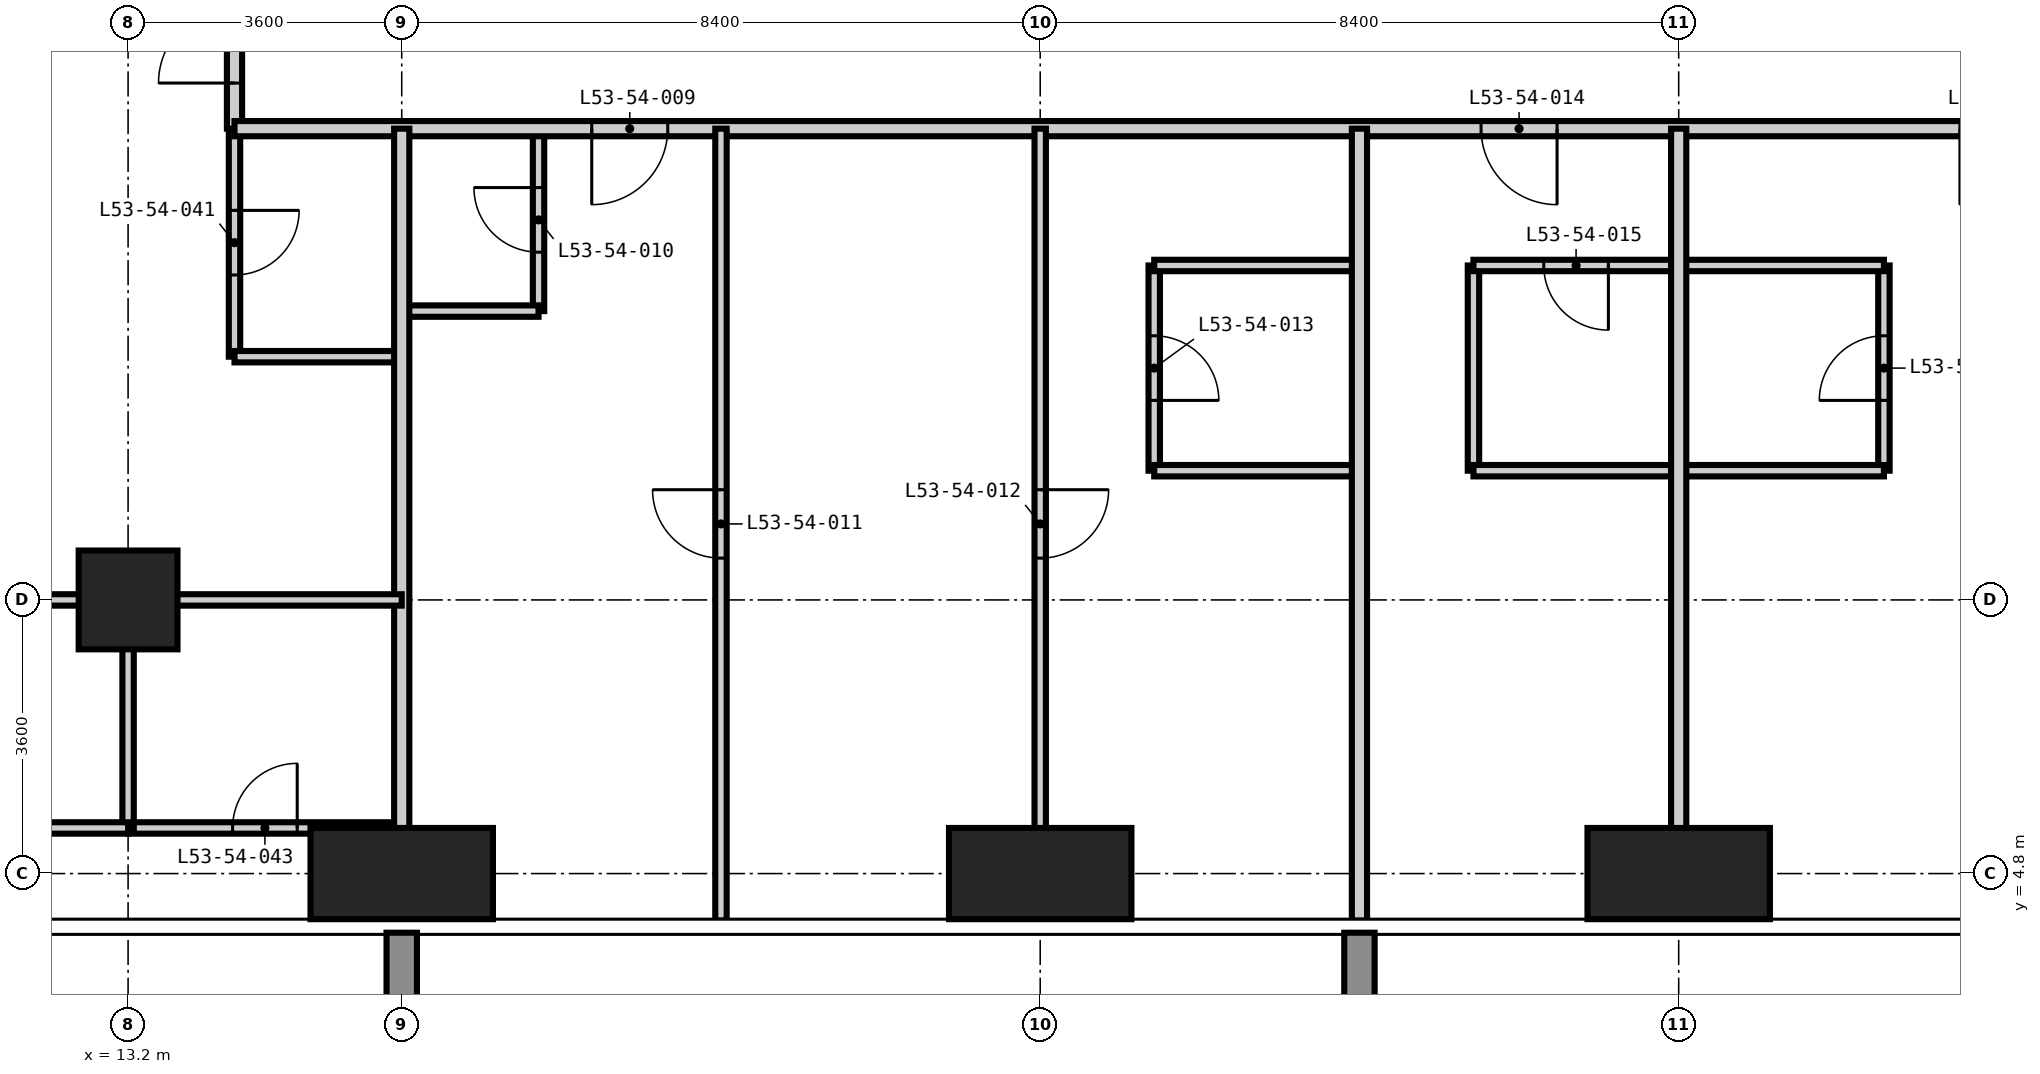
"""IFC4 building model, lengths in metres.
Left out: names, types, materials, properties, quantities, classifications, styles, units other than length and angle.
Written with IfcOpenShell. Run it as: python <this file> out.ifc"""

import sys

from ifc_helpers import new_model, si_unit, direction, frame, frame_2d, origin, origin_2d, place, context, subcontext, project, spatial, rectangle, extrude, element, fill, save


model = new_model("IFC4")
c1 = context("Model", 3, precision=1e-05, world=origin(), true_north=direction((0.0, 1.0)))
c2 = subcontext(c1, "Body", "Model", "MODEL_VIEW")
j1 = project(units=[si_unit("LENGTHUNIT", "METRE"), si_unit("PLANEANGLEUNIT", "RADIAN")], contexts=[c1])
p1 = place(None, origin())
s1 = spatial("IfcSite", under=j1, at=p1, CompositionType="ELEMENT")
p2 = place(p1, origin())
s2 = spatial("IfcBuilding", under=s1, at=p2, CompositionType="ELEMENT")
p3 = place(p2, frame((0.0, 0.0, 205.8)))
s3 = spatial("IfcBuildingStorey", under=s2, at=p3, CompositionType="ELEMENT", Elevation=205.8)
p4 = place(p3, frame((13.2, 8.4, -0.35), z_axis=(0.0, 0.0, 1.0), x_axis=(1.0, 0.0, 0.0)))
e1 = element("IfcColumn", 1, at=p4, inside=s3, PredefinedType="COLUMN", context=c2, shape_type="SweptSolid", body=[
    extrude(rectangle(XDim=1.3, YDim=1.3, at=origin_2d()), origin(), (0.0, 0.0, 1.0), 3.6),
])
for number, where, z_axis, x_axis in (
    (2, (16.8, 4.8, -0.35), (0.0, 0.0, 1.0), (1.0, 0.0, 0.0)),
    (3, (25.2, 4.8, -0.35), (0.0, 0.0, 1.0), (1.0, 0.0, 0.0)),
    (4, (33.6, 4.8, -0.35), (0.0, 0.0, 1.0), (1.0, 0.0, 0.0)),
):
    element("IfcColumn", number, at=place(p3, frame(where, z_axis=z_axis, x_axis=x_axis)), inside=s3, PredefinedType="COLUMN", context=c2, shape_type="SweptSolid", body=[
        extrude(rectangle(XDim=2.4, YDim=1.2, at=origin_2d()), origin(), (0.0, 0.0, 1.0), 3.6),
    ])
p5 = place(p3, frame((14.6, 11.6, 0.0), z_axis=(0.0, 0.0, 1.0), x_axis=(0.0, 1.0, 0.0)))
e5 = element("IfcWall", 5, at=p5, inside=s3, PredefinedType="PARTITIONING", context=c2, shape_type="SweptSolid", body=[
    extrude(rectangle(XDim=3.0, YDim=0.15, at=frame_2d((1.5, 0.0))), origin(), (0.0, 0.0, 1.0), 3.25),
])
p6 = place(p5, frame((1.075, 0.0, 0.0)))
e6 = element("IfcOpeningElement", 6, at=p6, cuts=e5, PredefinedType="OPENING", context=c2, shape_type="SweptSolid", body=[
    extrude(rectangle(XDim=0.85, YDim=2.1, at=frame_2d((0.425, 1.05))), frame((0.0, 0.085, 0.0), z_axis=(0.0, -1.0, 0.0), x_axis=(1.0, 0.0, 0.0)), (0.0, 0.0, 1.0), 0.17),
])
p7 = place(p3, frame((18.6, 12.2, 0.0), z_axis=(0.0, 0.0, 1.0), x_axis=(0.0, 1.0, 0.0)))
e7 = element("IfcWall", 7, at=p7, inside=s3, PredefinedType="PARTITIONING", context=c2, shape_type="SweptSolid", body=[
    extrude(rectangle(XDim=2.4, YDim=0.15, at=frame_2d((1.2, 0.0))), origin(), (0.0, 0.0, 1.0), 3.25),
])
p8 = place(p7, frame((0.775, 0.0, 0.0)))
e8 = element("IfcOpeningElement", 8, at=p8, cuts=e7, PredefinedType="OPENING", context=c2, shape_type="SweptSolid", body=[
    extrude(rectangle(XDim=0.85, YDim=2.1, at=frame_2d((0.425, 1.05))), frame((0.0, 0.085, 0.0), z_axis=(0.0, -1.0, 0.0), x_axis=(1.0, 0.0, 0.0)), (0.0, 0.0, 1.0), 0.17),
])
p9 = place(p3, frame((26.7, 10.1, 0.0), z_axis=(0.0, 0.0, 1.0), x_axis=(0.0, 1.0, 0.0)))
e9 = element("IfcWall", 9, at=p9, inside=s3, PredefinedType="PARTITIONING", context=c2, shape_type="SweptSolid", body=[
    extrude(rectangle(XDim=2.7, YDim=0.15, at=frame_2d((1.35, 0.0))), origin(), (0.0, 0.0, 1.0), 3.25),
])
p10 = place(p9, frame((0.925, 0.0, 0.0)))
e10 = element("IfcOpeningElement", 10, at=p10, cuts=e9, PredefinedType="OPENING", context=c2, shape_type="SweptSolid", body=[
    extrude(rectangle(XDim=0.85, YDim=2.1, at=frame_2d((0.425, 1.05))), frame((0.0, 0.085, 0.0), z_axis=(0.0, -1.0, 0.0), x_axis=(1.0, 0.0, 0.0)), (0.0, 0.0, 1.0), 0.17),
])
p11 = place(p3, frame((30.9, 10.1, 0.0), z_axis=(0.0, 0.0, 1.0), x_axis=(0.0, 1.0, 0.0)))
e11 = element("IfcWall", 11, at=p11, inside=s3, PredefinedType="PARTITIONING", context=c2, shape_type="SweptSolid", body=[
    extrude(rectangle(XDim=2.7, YDim=0.15, at=frame_2d((1.35, 0.0))), origin(), (0.0, 0.0, 1.0), 3.25),
])
p12 = place(p3, frame((36.3, 10.1, 0.0), z_axis=(0.0, 0.0, 1.0), x_axis=(0.0, 1.0, 0.0)))
e12 = element("IfcWall", 12, at=p12, inside=s3, PredefinedType="PARTITIONING", context=c2, shape_type="SweptSolid", body=[
    extrude(rectangle(XDim=2.7, YDim=0.15, at=frame_2d((1.35, 0.0))), origin(), (0.0, 0.0, 1.0), 3.25),
])
p13 = place(p12, frame((0.925, 0.0, 0.0)))
e13 = element("IfcOpeningElement", 13, at=p13, cuts=e12, PredefinedType="OPENING", context=c2, shape_type="SweptSolid", body=[
    extrude(rectangle(XDim=0.85, YDim=2.1, at=frame_2d((0.425, 1.05))), frame((0.0, 0.085, 0.0), z_axis=(0.0, -1.0, 0.0), x_axis=(1.0, 0.0, 0.0)), (0.0, 0.0, 1.0), 0.17),
])
p14 = place(p3, frame((13.2, 5.4, 0.0), z_axis=(0.0, 0.0, 1.0), x_axis=(1.0, 0.0, 0.0)))
e14 = element("IfcWall", 14, at=p14, inside=s3, PredefinedType="PARTITIONING", context=c2, shape_type="SweptSolid", body=[
    extrude(rectangle(XDim=3.6, YDim=0.15, at=frame_2d((1.8, 0.0))), origin(), (0.0, 0.0, 1.0), 3.25),
])
p15 = place(p14, frame((1.375, 0.0, 0.0)))
e15 = element("IfcOpeningElement", 15, at=p15, cuts=e14, PredefinedType="OPENING", context=c2, shape_type="SweptSolid", body=[
    extrude(rectangle(XDim=0.85, YDim=2.1, at=frame_2d((0.425, 1.05))), frame((0.0, 0.085, 0.0), z_axis=(0.0, -1.0, 0.0), x_axis=(1.0, 0.0, 0.0)), (0.0, 0.0, 1.0), 0.17),
])
p16 = place(p3, frame((26.7, 10.1, 0.0), z_axis=(0.0, 0.0, 1.0), x_axis=(1.0, 0.0, 0.0)))
e16 = element("IfcWall", 16, at=p16, inside=s3, PredefinedType="PARTITIONING", context=c2, shape_type="SweptSolid", body=[
    extrude(rectangle(XDim=2.7, YDim=0.15, at=frame_2d((1.35, 0.0))), origin(), (0.0, 0.0, 1.0), 3.25),
])
p17 = place(p3, frame((30.9, 10.1, 0.0), z_axis=(0.0, 0.0, 1.0), x_axis=(1.0, 0.0, 0.0)))
e17 = element("IfcWall", 17, at=p17, inside=s3, PredefinedType="PARTITIONING", context=c2, shape_type="SweptSolid", body=[
    extrude(rectangle(XDim=5.4, YDim=0.15, at=frame_2d((2.7, 0.0))), origin(), (0.0, 0.0, 1.0), 3.25),
])
p18 = place(p3, frame((14.6, 11.6, 0.0), z_axis=(0.0, 0.0, 1.0), x_axis=(1.0, 0.0, 0.0)))
e18 = element("IfcWall", 18, at=p18, inside=s3, PredefinedType="PARTITIONING", context=c2, shape_type="SweptSolid", body=[
    extrude(rectangle(XDim=2.2, YDim=0.15, at=frame_2d((1.1, 0.0))), origin(), (0.0, 0.0, 1.0), 3.25),
])
p19 = place(p3, frame((16.8, 12.2, 0.0), z_axis=(0.0, 0.0, 1.0), x_axis=(1.0, 0.0, 0.0)))
e19 = element("IfcWall", 19, at=p19, inside=s3, PredefinedType="PARTITIONING", context=c2, shape_type="SweptSolid", body=[
    extrude(rectangle(XDim=1.8, YDim=0.15, at=frame_2d((0.9, 0.0))), origin(), (0.0, 0.0, 1.0), 3.25),
])
p20 = place(p3, frame((26.7, 12.8, 0.0), z_axis=(0.0, 0.0, 1.0), x_axis=(1.0, 0.0, 0.0)))
e20 = element("IfcWall", 20, at=p20, inside=s3, PredefinedType="PARTITIONING", context=c2, shape_type="SweptSolid", body=[
    extrude(rectangle(XDim=2.7, YDim=0.15, at=frame_2d((1.35, 0.0))), origin(), (0.0, 0.0, 1.0), 3.25),
])
p21 = place(p3, frame((30.9, 12.8, 0.0), z_axis=(0.0, 0.0, 1.0), x_axis=(1.0, 0.0, 0.0)))
e21 = element("IfcWall", 21, at=p21, inside=s3, PredefinedType="PARTITIONING", context=c2, shape_type="SweptSolid", body=[
    extrude(rectangle(XDim=5.4, YDim=0.15, at=frame_2d((2.7, 0.0))), origin(), (0.0, 0.0, 1.0), 3.25),
])
p22 = place(p21, frame((0.925, 0.0, 0.0)))
e22 = element("IfcOpeningElement", 22, at=p22, cuts=e21, PredefinedType="OPENING", context=c2, shape_type="SweptSolid", body=[
    extrude(rectangle(XDim=0.85, YDim=2.1, at=frame_2d((0.425, 1.05))), frame((0.0, 0.085, 0.0), z_axis=(0.0, -1.0, 0.0), x_axis=(1.0, 0.0, 0.0)), (0.0, 0.0, 1.0), 0.17),
])
p23 = place(p3, frame((14.6, 14.6, 0.0), z_axis=(0.0, 0.0, 1.0), x_axis=(0.0, 1.0, 0.0)))
e23 = element("IfcWall", 23, at=p23, inside=s3, PredefinedType="PARTITIONING", context=c2, shape_type="SweptSolid", body=[
    extrude(rectangle(XDim=13.0, YDim=0.2, at=frame_2d((6.5, 0.0))), origin(), (0.0, 0.0, 1.0), 3.25),
])
p24 = place(p23, frame((3.8, 0.0, 0.0)))
e24 = element("IfcOpeningElement", 24, at=p24, cuts=e23, PredefinedType="OPENING", context=c2, shape_type="SweptSolid", body=[
    extrude(rectangle(XDim=1.0, YDim=2.2, at=frame_2d((0.5, 1.1))), frame((0.0, 0.11, 0.0), z_axis=(0.0, -1.0, 0.0), x_axis=(1.0, 0.0, 0.0)), (0.0, 0.0, 1.0), 0.22),
])
p25 = place(p23, frame((8.0, 0.0, 0.0)))
e25 = element("IfcOpeningElement", 25, at=p25, cuts=e23, PredefinedType="OPENING", context=c2, shape_type="SweptSolid", body=[
    extrude(rectangle(XDim=1.0, YDim=2.2, at=frame_2d((0.5, 1.1))), frame((0.0, 0.11, 0.0), z_axis=(0.0, -1.0, 0.0), x_axis=(1.0, 0.0, 0.0)), (0.0, 0.0, 1.0), 0.22),
])
p26 = place(p23, frame((0.6, 0.0, 0.0)))
e26 = element("IfcOpeningElement", 26, at=p26, cuts=e23, PredefinedType="OPENING", context=c2, shape_type="SweptSolid", body=[
    extrude(rectangle(XDim=1.0, YDim=2.2, at=frame_2d((0.5, 1.1))), frame((0.0, 0.11, 0.0), z_axis=(0.0, -1.0, 0.0), x_axis=(1.0, 0.0, 0.0)), (0.0, 0.0, 1.0), 0.22),
])
p27 = place(p3, frame((44.8, 14.6, 0.0), z_axis=(0.0, 0.0, 1.0), x_axis=(-1.0, 0.0, 0.0)))
e27 = element("IfcWall", 27, at=p27, inside=s3, PredefinedType="PARTITIONING", context=c2, shape_type="SweptSolid", body=[
    extrude(rectangle(XDim=30.2, YDim=0.2, at=frame_2d((15.1, 0.0))), origin(), (0.0, 0.0, 1.0), 3.25),
])
p28 = place(p27, frame((24.5, 0.0, 0.0)))
e28 = element("IfcOpeningElement", 28, at=p28, cuts=e27, PredefinedType="OPENING", context=c2, shape_type="SweptSolid", body=[
    extrude(rectangle(XDim=1.0, YDim=2.2, at=frame_2d((0.5, 1.1))), frame((0.0, 0.11, 0.0), z_axis=(0.0, -1.0, 0.0), x_axis=(1.0, 0.0, 0.0)), (0.0, 0.0, 1.0), 0.22),
])
p29 = place(p27, frame((12.8, 0.0, 0.0)))
e29 = element("IfcOpeningElement", 29, at=p29, cuts=e27, PredefinedType="OPENING", context=c2, shape_type="SweptSolid", body=[
    extrude(rectangle(XDim=1.0, YDim=2.2, at=frame_2d((0.5, 1.1))), frame((0.0, 0.11, 0.0), z_axis=(0.0, -1.0, 0.0), x_axis=(1.0, 0.0, 0.0)), (0.0, 0.0, 1.0), 0.22),
])
p30 = place(p27, frame((6.5, 0.0, 0.0)))
e30 = element("IfcOpeningElement", 30, at=p30, cuts=e27, PredefinedType="OPENING", context=c2, shape_type="SweptSolid", body=[
    extrude(rectangle(XDim=1.0, YDim=2.2, at=frame_2d((0.5, 1.1))), frame((0.0, 0.11, 0.0), z_axis=(0.0, -1.0, 0.0), x_axis=(1.0, 0.0, 0.0)), (0.0, 0.0, 1.0), 0.22),
])
for number, where, z_axis, x_axis in (
    (31, (16.8, 4.182, 0.0), (0.0, 0.0, 1.0), (0.0, 1.0, 0.0)),
    (32, (29.4, 4.182, 0.0), (0.0, 0.0, 1.0), (0.0, 1.0, 0.0)),
    (33, (33.6, 4.182, 0.0), (0.0, 0.0, 1.0), (0.0, 1.0, 0.0)),
):
    element("IfcWall", number, at=place(p3, frame(where, z_axis=z_axis, x_axis=x_axis)), inside=s3, PredefinedType="PARTITIONING", context=c2, shape_type="SweptSolid", body=[
        extrude(rectangle(XDim=10.418, YDim=0.2, at=frame_2d((5.209, 0.0))), origin(), (0.0, 0.0, 1.0), 3.25),
    ])
p31 = place(p3, frame((13.2, 5.4, 0.0), z_axis=(0.0, 0.0, 1.0), x_axis=(0.0, 1.0, 0.0)))
e34 = element("IfcWall", 34, at=p31, inside=s3, PredefinedType="PARTITIONING", context=c2, shape_type="SweptSolid", body=[
    extrude(rectangle(XDim=3.0, YDim=0.15, at=frame_2d((1.5, 0.0))), origin(), (0.0, 0.0, 1.0), 3.25),
])
p32 = place(p3, frame((21.0, 4.182, 0.0), z_axis=(0.0, 0.0, 1.0), x_axis=(0.0, 1.0, 0.0)))
e35 = element("IfcWall", 35, at=p32, inside=s3, PredefinedType="PARTITIONING", context=c2, shape_type="SweptSolid", body=[
    extrude(rectangle(XDim=10.418, YDim=0.15, at=frame_2d((5.209, 0.0))), origin(), (0.0, 0.0, 1.0), 3.25),
])
p33 = place(p32, frame((4.768, 0.0, 0.0)))
e36 = element("IfcOpeningElement", 36, at=p33, cuts=e35, PredefinedType="OPENING", context=c2, shape_type="SweptSolid", body=[
    extrude(rectangle(XDim=0.9, YDim=2.1, at=frame_2d((0.45, 1.05))), frame((0.0, 0.085, 0.0), z_axis=(0.0, -1.0, 0.0), x_axis=(1.0, 0.0, 0.0)), (0.0, 0.0, 1.0), 0.17),
])
p34 = place(p3, frame((25.2, 4.182, 0.0), z_axis=(0.0, 0.0, 1.0), x_axis=(0.0, 1.0, 0.0)))
e37 = element("IfcWall", 37, at=p34, inside=s3, PredefinedType="PARTITIONING", context=c2, shape_type="SweptSolid", body=[
    extrude(rectangle(XDim=10.418, YDim=0.15, at=frame_2d((5.209, 0.0))), origin(), (0.0, 0.0, 1.0), 3.25),
])
p35 = place(p34, frame((4.768, 0.0, 0.0)))
e38 = element("IfcOpeningElement", 38, at=p35, cuts=e37, PredefinedType="OPENING", context=c2, shape_type="SweptSolid", body=[
    extrude(rectangle(XDim=0.9, YDim=2.1, at=frame_2d((0.45, 1.05))), frame((0.0, 0.085, 0.0), z_axis=(0.0, -1.0, 0.0), x_axis=(1.0, 0.0, 0.0)), (0.0, 0.0, 1.0), 0.17),
])
p36 = place(p3, frame((10.8, 5.4, 0.0), z_axis=(0.0, 0.0, 1.0), x_axis=(1.0, 0.0, 0.0)))
e39 = element("IfcWall", 39, at=p36, inside=s3, PredefinedType="PARTITIONING", context=c2, shape_type="SweptSolid", body=[
    extrude(rectangle(XDim=2.4, YDim=0.15, at=frame_2d((1.2, 0.0))), origin(), (0.0, 0.0, 1.0), 3.25),
])
p37 = place(p3, frame((4.182, 8.4, 0.0), z_axis=(0.0, 0.0, 1.0), x_axis=(1.0, 0.0, 0.0)))
e40 = element("IfcWall", 40, at=p37, inside=s3, PredefinedType="PARTITIONING", context=c2, shape_type="SweptSolid", body=[
    extrude(rectangle(XDim=12.618, YDim=0.15, at=frame_2d((6.309, 0.0))), origin(), (0.0, 0.0, 1.0), 3.25),
])
p38 = place(p37, frame((2.868, 0.0, 0.0)))
e41 = element("IfcOpeningElement", 41, at=p38, cuts=e40, PredefinedType="OPENING", context=c2, shape_type="SweptSolid", body=[
    extrude(rectangle(XDim=0.9, YDim=2.1, at=frame_2d((0.45, 1.05))), frame((0.0, 0.085, 0.0), z_axis=(0.0, -1.0, 0.0), x_axis=(1.0, 0.0, 0.0)), (0.0, 0.0, 1.0), 0.17),
])
p39 = place(p28, origin())
e42 = element("IfcDoor", 42, at=p39, inside=s3, OperationType="SINGLE_SWING_RIGHT", PredefinedType="DOOR", context=c2, shape_type="SweptSolid", body=[
    extrude(rectangle(XDim=1.0, YDim=2.2, at=frame_2d((0.5, 1.1))), frame((0.0, 0.025, 0.0), z_axis=(0.0, -1.0, 0.0), x_axis=(1.0, 0.0, 0.0)), (0.0, 0.0, 1.0), 0.05),
])
fill(e28, e42)
p40 = place(p8, origin())
e43 = element("IfcDoor", 43, at=p40, inside=s3, OperationType="SINGLE_SWING_RIGHT", PredefinedType="DOOR", context=c2, shape_type="SweptSolid", body=[
    extrude(rectangle(XDim=0.85, YDim=2.1, at=frame_2d((0.425, 1.05))), frame((0.0, 0.025, 0.0), z_axis=(0.0, -1.0, 0.0), x_axis=(1.0, 0.0, 0.0)), (0.0, 0.0, 1.0), 0.05),
])
fill(e8, e43)
p41 = place(p33, origin())
e44 = element("IfcDoor", 44, at=p41, inside=s3, OperationType="SINGLE_SWING_RIGHT", PredefinedType="DOOR", context=c2, shape_type="SweptSolid", body=[
    extrude(rectangle(XDim=0.9, YDim=2.1, at=frame_2d((0.45, 1.05))), frame((0.0, 0.025, 0.0), z_axis=(0.0, -1.0, 0.0), x_axis=(1.0, 0.0, 0.0)), (0.0, 0.0, 1.0), 0.05),
])
fill(e36, e44)
p42 = place(p35, frame((0.9, 0.0, 0.0), z_axis=(0.0, 0.0, 1.0), x_axis=(-1.0, 0.0, 0.0)))
e45 = element("IfcDoor", 45, at=p42, inside=s3, OperationType="SINGLE_SWING_LEFT", PredefinedType="DOOR", context=c2, shape_type="SweptSolid", body=[
    extrude(rectangle(XDim=0.9, YDim=2.1, at=frame_2d((0.45, 1.05))), frame((0.0, 0.025, 0.0), z_axis=(0.0, -1.0, 0.0), x_axis=(1.0, 0.0, 0.0)), (0.0, 0.0, 1.0), 0.05),
])
fill(e38, e45)
p43 = place(p10, frame((0.85, 0.0, 0.0), z_axis=(0.0, 0.0, 1.0), x_axis=(-1.0, 0.0, 0.0)))
e46 = element("IfcDoor", 46, at=p43, inside=s3, OperationType="SINGLE_SWING_RIGHT", PredefinedType="DOOR", context=c2, shape_type="SweptSolid", body=[
    extrude(rectangle(XDim=0.85, YDim=2.1, at=frame_2d((0.425, 1.05))), frame((0.0, 0.025, 0.0), z_axis=(0.0, -1.0, 0.0), x_axis=(1.0, 0.0, 0.0)), (0.0, 0.0, 1.0), 0.05),
])
fill(e10, e46)
p44 = place(p29, origin())
e47 = element("IfcDoor", 47, at=p44, inside=s3, OperationType="SINGLE_SWING_LEFT", PredefinedType="DOOR", context=c2, shape_type="SweptSolid", body=[
    extrude(rectangle(XDim=1.0, YDim=2.2, at=frame_2d((0.5, 1.1))), frame((0.0, 0.025, 0.0), z_axis=(0.0, -1.0, 0.0), x_axis=(1.0, 0.0, 0.0)), (0.0, 0.0, 1.0), 0.05),
])
fill(e29, e47)
p45 = place(p22, frame((0.85, 0.0, 0.0), z_axis=(0.0, 0.0, 1.0), x_axis=(-1.0, 0.0, 0.0)))
e48 = element("IfcDoor", 48, at=p45, inside=s3, OperationType="SINGLE_SWING_LEFT", PredefinedType="DOOR", context=c2, shape_type="SweptSolid", body=[
    extrude(rectangle(XDim=0.85, YDim=2.1, at=frame_2d((0.425, 1.05))), frame((0.0, 0.025, 0.0), z_axis=(0.0, -1.0, 0.0), x_axis=(1.0, 0.0, 0.0)), (0.0, 0.0, 1.0), 0.05),
])
fill(e22, e48)
p46 = place(p13, origin())
e49 = element("IfcDoor", 49, at=p46, inside=s3, OperationType="SINGLE_SWING_LEFT", PredefinedType="DOOR", context=c2, shape_type="SweptSolid", body=[
    extrude(rectangle(XDim=0.85, YDim=2.1, at=frame_2d((0.425, 1.05))), frame((0.0, 0.025, 0.0), z_axis=(0.0, -1.0, 0.0), x_axis=(1.0, 0.0, 0.0)), (0.0, 0.0, 1.0), 0.05),
])
fill(e13, e49)
p47 = place(p26, origin())
e50 = element("IfcDoor", 50, at=p47, inside=s3, OperationType="SINGLE_SWING_LEFT", PredefinedType="DOOR", context=c2, shape_type="SweptSolid", body=[
    extrude(rectangle(XDim=1.0, YDim=2.2, at=frame_2d((0.5, 1.1))), frame((0.0, 0.025, 0.0), z_axis=(0.0, -1.0, 0.0), x_axis=(1.0, 0.0, 0.0)), (0.0, 0.0, 1.0), 0.05),
])
fill(e26, e50)
p48 = place(p6, frame((0.85, 0.0, 0.0), z_axis=(0.0, 0.0, 1.0), x_axis=(-1.0, 0.0, 0.0)))
e51 = element("IfcDoor", 51, at=p48, inside=s3, OperationType="SINGLE_SWING_LEFT", PredefinedType="DOOR", context=c2, shape_type="SweptSolid", body=[
    extrude(rectangle(XDim=0.85, YDim=2.1, at=frame_2d((0.425, 1.05))), frame((0.0, 0.025, 0.0), z_axis=(0.0, -1.0, 0.0), x_axis=(1.0, 0.0, 0.0)), (0.0, 0.0, 1.0), 0.05),
])
fill(e6, e51)
p49 = place(p15, origin())
e52 = element("IfcDoor", 52, at=p49, inside=s3, OperationType="SINGLE_SWING_RIGHT", PredefinedType="DOOR", context=c2, shape_type="SweptSolid", body=[
    extrude(rectangle(XDim=0.85, YDim=2.1, at=frame_2d((0.425, 1.05))), frame((0.0, 0.025, 0.0), z_axis=(0.0, -1.0, 0.0), x_axis=(1.0, 0.0, 0.0)), (0.0, 0.0, 1.0), 0.05),
])
fill(e15, e52)
save(model, sys.argv[1])
